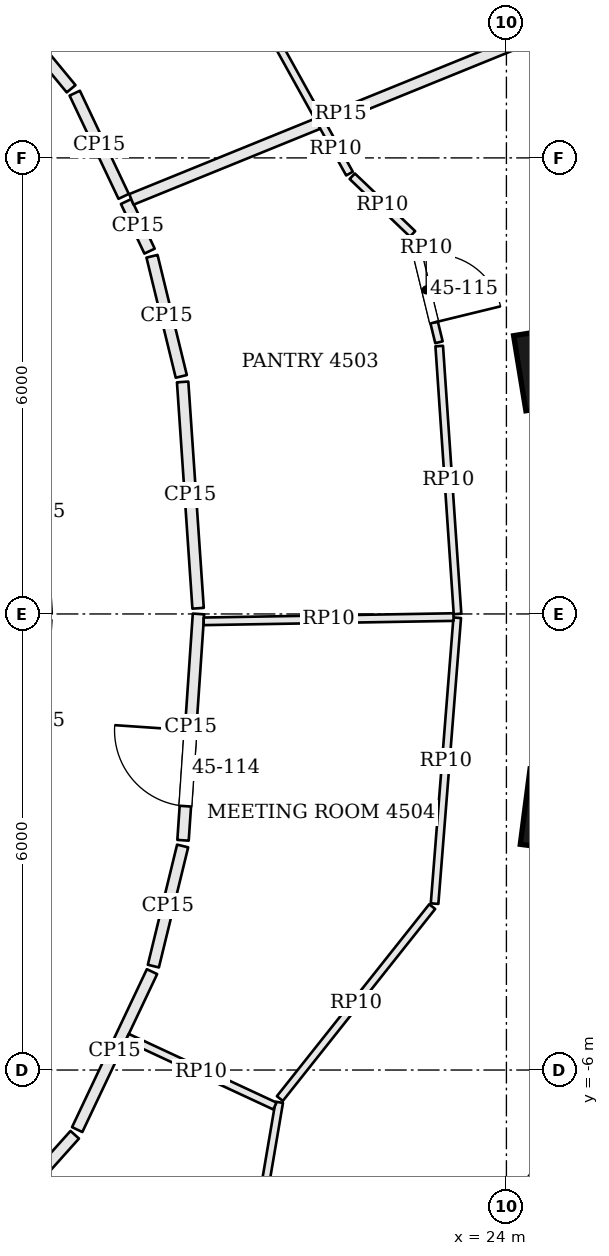
"""IFC4 building model, lengths in metres.
Left out: names, types, materials, properties, quantities, classifications, styles, units other than length and angle.
Written with IfcOpenShell. Run it as: python <this file> out.ifc"""

import sys

from ifc_helpers import new_model, si_unit, direction, frame, frame_2d, origin, origin_2d, place, context, subcontext, project, spatial, rectangle, extrude, element, fill, save


model = new_model("IFC4")
c1 = context("Model", 3, precision=1e-05, world=origin(), true_north=direction((0.0, 1.0)))
c2 = subcontext(c1, "Body", "Model", "MODEL_VIEW")
j1 = project(units=[si_unit("LENGTHUNIT", "METRE"), si_unit("PLANEANGLEUNIT", "RADIAN")], contexts=[c1])
p1 = place(None, origin())
s1 = spatial("IfcSite", under=j1, at=p1, CompositionType="ELEMENT")
p2 = place(p1, origin())
s2 = spatial("IfcBuilding", under=s1, at=p2, CompositionType="ELEMENT")
p3 = place(p2, frame((0.0, 0.0, 185.7)))
s3 = spatial("IfcBuildingStorey", under=s2, at=p3, CompositionType="ELEMENT", Elevation=185.7)
for number, where, z_axis, x_axis in (
    (1, (24.669, 3.248, 0.0), (0.0, 0.0, 1.0), (-0.162, 0.987, 0.0)),
    (2, (24.743, -2.599, 0.0), (0.0, 0.0, 1.0), (0.128, 0.992, 0.0)),
):
    element("IfcColumn", number, at=place(p3, frame(where, z_axis=z_axis, x_axis=x_axis)), inside=s3, PredefinedType="COLUMN", context=c2, shape_type="SweptSolid", body=[
        extrude(rectangle(XDim=1.0, YDim=1.0, at=origin_2d()), origin(), (0.0, 0.0, 1.0), 3.9),
    ])
p4 = place(p3, frame((24.282, -7.774, 0.0), z_axis=(0.0, 0.0, 1.0), x_axis=(0.621735490397, 0.783227285008, 0.0)))
e3 = element("IfcWall", 3, at=p4, inside=s3, PredefinedType="SOLIDWALL", context=c2, shape_type="SweptSolid", body=[
    extrude(rectangle(XDim=4.625, YDim=0.45, at=frame_2d((2.312, 0.0))), origin(), (0.0, 0.0, 1.0), 3.7),
])
p5 = place(p4, frame((1.262, 0.0, 0.9)))
e4 = element("IfcOpeningElement", 4, at=p5, cuts=e3, PredefinedType="OPENING", context=c2, shape_type="SweptSolid", body=[
    extrude(rectangle(XDim=2.1, YDim=2.3, at=frame_2d((1.05, 1.15))), frame((0.0, 0.235, 0.0), z_axis=(0.0, -1.0, 0.0), x_axis=(1.0, 0.0, 0.0)), (0.0, 0.0, 1.0), 0.47),
])
p6 = place(p3, frame((16.193, -9.229, 0.0), z_axis=(0.0, 0.0, 1.0), x_axis=(0.666882089048, 0.745163256815, 0.0)))
e5 = element("IfcWall", 5, at=p6, inside=s3, PredefinedType="PARTITIONING", context=c2, shape_type="SweptSolid", body=[
    extrude(rectangle(XDim=3.19, YDim=0.15, at=frame_2d((1.595, 0.0))), origin(), (0.0, 0.0, 1.0), 3.084),
])
p7 = place(p3, frame((18.353, -6.784, 0.0), z_axis=(0.0, 0.0, 1.0), x_axis=(0.428086344739, 0.903737838894, 0.0)))
e6 = element("IfcWall", 6, at=p7, inside=s3, PredefinedType="PARTITIONING", context=c2, shape_type="SweptSolid", body=[
    extrude(rectangle(XDim=2.3, YDim=0.15, at=frame_2d((1.15, 0.0))), origin(), (0.0, 0.0, 1.0), 3.084),
])
p8 = place(p3, frame((19.355, -4.633, 0.0), z_axis=(0.0, 0.0, 1.0), x_axis=(0.236703930685, 0.971581828359, 0.0)))
e7 = element("IfcWall", 7, at=p8, inside=s3, PredefinedType="PARTITIONING", context=c2, shape_type="SweptSolid", body=[
    extrude(rectangle(XDim=1.626, YDim=0.15, at=frame_2d((0.813, 0.0))), origin(), (0.0, 0.0, 1.0), 3.084),
])
p9 = place(p3, frame((19.745, -2.978, 0.0), z_axis=(0.0, 0.0, 1.0), x_axis=(0.068142324, 0.997675610447, 0.0)))
e8 = element("IfcWall", 8, at=p9, inside=s3, PredefinedType="PARTITIONING", context=c2, shape_type="SweptSolid", body=[
    extrude(rectangle(XDim=2.984, YDim=0.15, at=frame_2d((1.492, 0.0))), origin(), (0.0, 0.0, 1.0), 3.084),
])
p10 = place(p9, frame((0.45, 0.0, 0.0)))
e9 = element("IfcOpeningElement", 9, at=p10, cuts=e8, PredefinedType="OPENING", context=c2, shape_type="SweptSolid", body=[
    extrude(rectangle(XDim=1.0, YDim=2.4, at=frame_2d((0.5, 1.2))), frame((0.0, 0.085, 0.0), z_axis=(0.0, -1.0, 0.0), x_axis=(1.0, 0.0, 0.0)), (0.0, 0.0, 1.0), 0.17),
])
p11 = place(p3, frame((19.944, 0.075, 0.0), z_axis=(0.0, 0.0, 1.0), x_axis=(-0.068136763128, 0.997675990245, 0.0)))
e10 = element("IfcWall", 10, at=p11, inside=s3, PredefinedType="PARTITIONING", context=c2, shape_type="SweptSolid", body=[
    extrude(rectangle(XDim=2.985, YDim=0.15, at=frame_2d((1.492, 0.0))), origin(), (0.0, 0.0, 1.0), 3.084),
])
p12 = place(p3, frame((19.722, 3.125, 0.0), z_axis=(0.0, 0.0, 1.0), x_axis=(-0.236703930685, 0.971581828359, 0.0)))
e11 = element("IfcWall", 11, at=p12, inside=s3, PredefinedType="PARTITIONING", context=c2, shape_type="SweptSolid", body=[
    extrude(rectangle(XDim=1.626, YDim=0.15, at=frame_2d((0.813, 0.0))), origin(), (0.0, 0.0, 1.0), 3.084),
])
p13 = place(p3, frame((19.305, 4.773, 0.0), z_axis=(0.0, 0.0, 1.0), x_axis=(-0.42817357332, 0.903696514938, 0.0)))
e12 = element("IfcWall", 12, at=p13, inside=s3, PredefinedType="PARTITIONING", context=c2, shape_type="SweptSolid", body=[
    extrude(rectangle(XDim=0.722, YDim=0.15, at=frame_2d((0.361, 0.0))), origin(), (0.0, 0.0, 1.0), 3.084),
])
p14 = place(p3, frame((24.574, 7.692, 0.0), z_axis=(0.0, 0.0, 1.0), x_axis=(-0.926449572976, -0.376418900606, 0.0)))
e13 = element("IfcWall", 13, at=p14, inside=s3, PredefinedType="PARTITIONING", context=c2, shape_type="SweptSolid", body=[
    extrude(rectangle(XDim=5.946, YDim=0.15, at=frame_2d((2.973, 0.0))), origin(), (0.0, 0.0, 1.0), 3.084),
])
p15 = place(p3, frame((18.964, 5.494, 0.0), z_axis=(0.0, 0.0, 1.0), x_axis=(-0.428135235203, 0.903714678633, 0.0)))
e14 = element("IfcWall", 14, at=p15, inside=s3, PredefinedType="PARTITIONING", context=c2, shape_type="SweptSolid", body=[
    extrude(rectangle(XDim=1.503, YDim=0.15, at=frame_2d((0.751, 0.0))), origin(), (0.0, 0.0, 1.0), 3.084),
])
p16 = place(p3, frame((18.273, 6.909, 0.0), z_axis=(0.0, 0.0, 1.0), x_axis=(-0.63653648943, 0.771246586783, 0.0)))
e15 = element("IfcWall", 15, at=p16, inside=s3, PredefinedType="PARTITIONING", context=c2, shape_type="SweptSolid", body=[
    extrude(rectangle(XDim=2.342, YDim=0.15, at=frame_2d((1.171, 0.0))), origin(), (0.0, 0.0, 1.0), 3.084),
])
p17 = place(p3, frame((21.571, 6.45, 0.0), z_axis=(0.0, 0.0, 1.0), x_axis=(0.485146235322, -0.874433033658, 0.0)))
e16 = element("IfcWall", 16, at=p17, inside=s3, PredefinedType="PARTITIONING", context=c2, shape_type="SweptSolid", body=[
    extrude(rectangle(XDim=0.751, YDim=0.1, at=frame_2d((0.375, 0.0))), origin(), (0.0, 0.0, 1.0), 3.084),
])
p18 = place(p3, frame((21.972, 5.759, 0.0), z_axis=(0.0, 0.0, 1.0), x_axis=(0.722719124143, -0.691141857796, 0.0)))
e17 = element("IfcWall", 17, at=p18, inside=s3, PredefinedType="PARTITIONING", context=c2, shape_type="SweptSolid", body=[
    extrude(rectangle(XDim=1.098, YDim=0.1, at=frame_2d((0.549, 0.0))), origin(), (0.0, 0.0, 1.0), 3.084),
])
p19 = place(p3, frame((22.777, 4.951, 0.0), z_axis=(0.0, 0.0, 1.0), x_axis=(0.236694434552, -0.971584141828, 0.0)))
e18 = element("IfcWall", 18, at=p19, inside=s3, PredefinedType="PARTITIONING", context=c2, shape_type="SweptSolid", body=[
    extrude(rectangle(XDim=1.417, YDim=0.1, at=frame_2d((0.708, 0.0))), origin(), (0.0, 0.0, 1.0), 3.084),
])
p20 = place(p19, frame((0.25, 0.0, 0.0)))
e19 = element("IfcOpeningElement", 19, at=p20, cuts=e18, PredefinedType="OPENING", context=c2, shape_type="SweptSolid", body=[
    extrude(rectangle(XDim=0.9, YDim=2.1, at=frame_2d((0.45, 1.05))), frame((0.0, 0.06, 0.0), z_axis=(0.0, -1.0, 0.0), x_axis=(1.0, 0.0, 0.0)), (0.0, 0.0, 1.0), 0.12),
])
p21 = place(p3, frame((23.116, 3.525, 0.0), z_axis=(0.0, 0.0, 1.0), x_axis=(0.068138009452, -0.997675905125, 0.0)))
e20 = element("IfcWall", 20, at=p21, inside=s3, PredefinedType="PARTITIONING", context=c2, shape_type="SweptSolid", body=[
    extrude(rectangle(XDim=3.533, YDim=0.1, at=frame_2d((1.767, 0.0))), origin(), (0.0, 0.0, 1.0), 3.084),
])
p22 = place(p3, frame((23.353, -0.05, 0.0), z_axis=(0.0, 0.0, 1.0), x_axis=(-0.078942785997, -0.996879148412, 0.0)))
e21 = element("IfcWall", 21, at=p22, inside=s3, PredefinedType="PARTITIONING", context=c2, shape_type="SweptSolid", body=[
    extrude(rectangle(XDim=3.773, YDim=0.1, at=frame_2d((1.886, 0.0))), origin(), (0.0, 0.0, 1.0), 3.084),
])
p23 = place(p3, frame((23.024, -3.85, 0.0), z_axis=(0.0, 0.0, 1.0), x_axis=(-0.621707275044, -0.783249681875, 0.0)))
e22 = element("IfcWall", 22, at=p23, inside=s3, PredefinedType="PARTITIONING", context=c2, shape_type="SweptSolid", body=[
    extrude(rectangle(XDim=3.224, YDim=0.1, at=frame_2d((1.612, 0.0))), origin(), (0.0, 0.0, 1.0), 3.084),
])
p24 = place(p3, frame((21.011, -6.424, 0.0), z_axis=(0.0, 0.0, 1.0), x_axis=(-0.167360753367, -0.985895723813, 0.0)))
e23 = element("IfcWall", 23, at=p24, inside=s3, PredefinedType="PARTITIONING", context=c2, shape_type="SweptSolid", body=[
    extrude(rectangle(XDim=3.154, YDim=0.1, at=frame_2d((1.577, 0.0))), origin(), (0.0, 0.0, 1.0), 3.084),
])
p25 = place(p3, frame((19.011, -5.57, 0.0), z_axis=(0.0, 0.0, 1.0), x_axis=(0.90673833646, -0.421693714908, 0.0)))
e24 = element("IfcWall", 24, at=p25, inside=s3, PredefinedType="PARTITIONING", context=c2, shape_type="SweptSolid", body=[
    extrude(rectangle(XDim=2.143, YDim=0.1, at=frame_2d((1.071, 0.0))), origin(), (0.0, 0.0, 1.0), 3.084),
])
p26 = place(p3, frame((20.017, -0.097, 0.0), z_axis=(0.0, 0.0, 1.0), x_axis=(0.999855368447, 0.017007121695, 0.0)))
e25 = element("IfcWall", 25, at=p26, inside=s3, PredefinedType="PARTITIONING", context=c2, shape_type="SweptSolid", body=[
    extrude(rectangle(XDim=3.287, YDim=0.1, at=frame_2d((1.644, 0.0))), origin(), (0.0, 0.0, 1.0), 3.084),
])
p27 = place(p3, frame((19.45, 10.273, 0.0), z_axis=(0.0, 0.0, 1.0), x_axis=(0.485130780077, -0.87444160824, 0.0)))
e26 = element("IfcWall", 26, at=p27, inside=s3, PredefinedType="PARTITIONING", context=c2, shape_type="SweptSolid", body=[
    extrude(rectangle(XDim=4.332, YDim=0.1, at=frame_2d((2.166, 0.0))), origin(), (0.0, 0.0, 1.0), 3.084),
])
p28 = place(p10, origin())
e27 = element("IfcDoor", 27, at=p28, inside=s3, OperationType="SINGLE_SWING_RIGHT", PredefinedType="DOOR", context=c2, shape_type="SweptSolid", body=[
    extrude(rectangle(XDim=1.0, YDim=2.4, at=frame_2d((0.5, 1.2))), frame((0.0, 0.025, 0.0), z_axis=(0.0, -1.0, 0.0), x_axis=(1.0, 0.0, 0.0)), (0.0, 0.0, 1.0), 0.05),
])
fill(e9, e27)
p29 = place(p20, origin())
e28 = element("IfcDoor", 28, at=p29, inside=s3, OperationType="SINGLE_SWING_RIGHT", PredefinedType="DOOR", context=c2, shape_type="SweptSolid", body=[
    extrude(rectangle(XDim=0.9, YDim=2.1, at=frame_2d((0.45, 1.05))), frame((0.0, 0.025, 0.0), z_axis=(0.0, -1.0, 0.0), x_axis=(1.0, 0.0, 0.0)), (0.0, 0.0, 1.0), 0.05),
])
fill(e19, e28)
save(model, sys.argv[1])
